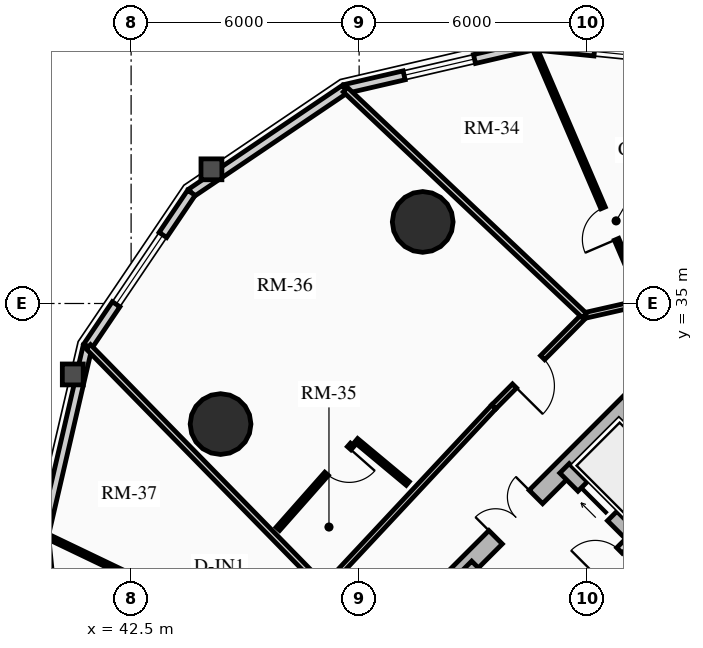
"""IFC4 building model, lengths in metres.
Left out: names, types, materials, properties, quantities, classifications, styles, units other than length and angle.
Written with IfcOpenShell. Run it as: python <this file> out.ifc"""

import sys

from ifc_helpers import new_model, si_unit, direction, frame, frame_2d, origin, origin_2d, place, context, subcontext, project, spatial, rectangle, circle, extrude, source, transform, mapped, element, fill, save


model = new_model("IFC4")
c1 = context("Model", 3, precision=1e-05, world=origin(), true_north=direction((0.0, 1.0)))
c2 = subcontext(c1, "Body", "Model", "MODEL_VIEW")
j1 = project(units=[si_unit("LENGTHUNIT", "METRE"), si_unit("PLANEANGLEUNIT", "RADIAN")], contexts=[c1])
p1 = place(None, origin())
s1 = spatial("IfcSite", under=j1, at=p1, CompositionType="ELEMENT")
p2 = place(p1, origin())
s2 = spatial("IfcBuilding", under=s1, at=p2, CompositionType="ELEMENT")
p3 = place(p2, frame((0.0, 0.0, 36.55)))
s3 = spatial("IfcBuildingStorey", under=s2, at=p3, CompositionType="ELEMENT", Elevation=36.55)
p4 = place(p3, frame((48.838, 25.596, 0.0), z_axis=(0.0, 0.0, 1.0), x_axis=(0.707106781187, 0.707106781187, 0.0)))
e1 = element("IfcWall", 1, at=p4, inside=s3, PredefinedType="SHEAR", context=c2, shape_type="SweptSolid", body=[
    extrude(rectangle(XDim=10.7, YDim=0.5, at=frame_2d((5.35, 0.0))), origin(), (0.0, 0.0, 1.0), 2.91),
])
m1 = source(origin(), c2, "Body", "SweptSolid", [
    extrude(rectangle(XDim=1.5, YDim=2.02, at=frame_2d((0.75, 1.01))), frame((0.0, 0.26, 0.0), z_axis=(0.0, -1.0, 0.0), x_axis=(1.0, 0.0, 0.0)), (0.0, 0.0, 1.0), 0.52),
])
p5 = place(p4, frame((4.6, 0.0, 0.0)))
e2 = element("IfcOpeningElement", 2, at=p5, cuts=e1, PredefinedType="OPENING", context=c2, shape_type="MappedRepresentation", body=[
    mapped(m1, transform((0.0, 0.0, 0.0), x_axis=(1.0, 0.0, 0.0), y_axis=(0.0, 1.0, 0.0), z_axis=(0.0, 0.0, 1.0), scale=1.0)),
])
p6 = place(p3, frame((61.096, 18.338, 0.0), z_axis=(0.0, 0.0, 1.0), x_axis=(-0.707106781187, 0.707106781187, 0.0)))
e3 = element("IfcWall", 3, at=p6, inside=s3, PredefinedType="SHEAR", context=c2, shape_type="SweptSolid", body=[
    extrude(rectangle(XDim=13.8, YDim=0.35, at=frame_2d((6.9, 0.0))), origin(), (0.0, 0.0, 1.0), 2.91),
])
m2 = source(origin(), c2, "Body", "SweptSolid", [
    extrude(rectangle(XDim=1.1, YDim=2.015, at=frame_2d((0.55, 1.007))), frame((0.0, 0.185, 0.0), z_axis=(0.0, -1.0, 0.0), x_axis=(1.0, 0.0, 0.0)), (0.0, 0.0, 1.0), 0.37),
])
p7 = place(p6, frame((4.9, 0.0, 0.0)))
e4 = element("IfcOpeningElement", 4, at=p7, cuts=e3, PredefinedType="OPENING", context=c2, shape_type="MappedRepresentation", body=[
    mapped(m2, transform((0.0, 0.0, 0.0), x_axis=(1.0, 0.0, 0.0), y_axis=(0.0, 1.0, 0.0), z_axis=(0.0, 0.0, 1.0), scale=1.0)),
])
m3 = source(origin(), c2, "Body", "SweptSolid", [
    extrude(rectangle(XDim=1.15, YDim=2.02, at=frame_2d((0.575, 1.01))), frame((0.0, 0.185, 0.0), z_axis=(0.0, -1.0, 0.0), x_axis=(1.0, 0.0, 0.0)), (0.0, 0.0, 1.0), 0.37),
])
p8 = place(p6, frame((7.32, 0.0, 0.0)))
e5 = element("IfcOpeningElement", 5, at=p8, cuts=e3, PredefinedType="OPENING", context=c2, shape_type="MappedRepresentation", body=[
    mapped(m3, transform((0.0, 0.0, 0.0), x_axis=(1.0, 0.0, 0.0), y_axis=(0.0, 1.0, 0.0), z_axis=(0.0, 0.0, 1.0), scale=1.0)),
])
p9 = place(p3, frame((63.662, 20.904, 0.0), z_axis=(0.0, 0.0, 1.0), x_axis=(-0.707106781187, 0.707106781187, 0.0)))
e6 = element("IfcWall", 6, at=p9, inside=s3, PredefinedType="SHEAR", context=c2, shape_type="SweptSolid", body=[
    extrude(rectangle(XDim=13.8, YDim=0.35, at=frame_2d((6.9, 0.0))), origin(), (0.0, 0.0, 1.0), 2.91),
])
p10 = place(p9, frame((10.025, 0.0, 0.0)))
e7 = element("IfcOpeningElement", 7, at=p10, cuts=e6, PredefinedType="OPENING", context=c2, shape_type="MappedRepresentation", body=[
    mapped(m2, transform((0.0, 0.0, 0.0), x_axis=(1.0, 0.0, 0.0), y_axis=(0.0, 1.0, 0.0), z_axis=(0.0, 0.0, 1.0), scale=1.0)),
])
p11 = place(p9, frame((12.025, 0.0, 0.0)))
e8 = element("IfcOpeningElement", 8, at=p11, cuts=e6, PredefinedType="OPENING", context=c2, shape_type="MappedRepresentation", body=[
    mapped(m2, transform((0.0, 0.0, 0.0), x_axis=(1.0, 0.0, 0.0), y_axis=(0.0, 1.0, 0.0), z_axis=(0.0, 0.0, 1.0), scale=1.0)),
])
p12 = place(p9, frame((5.33, 0.0, 0.0)))
e9 = element("IfcOpeningElement", 9, at=p12, cuts=e6, PredefinedType="OPENING", context=c2, shape_type="MappedRepresentation", body=[
    mapped(m3, transform((0.0, 0.0, 0.0), x_axis=(1.0, 0.0, 0.0), y_axis=(0.0, 1.0, 0.0), z_axis=(0.0, 0.0, 1.0), scale=1.0)),
])
for number, where, z_axis, x_axis in (
    (10, (50.173, 37.146, 0.0), (0.0, 0.0, 1.0), (1.0, 0.0, 0.0)),
    (11, (44.854, 31.827, 0.0), (0.0, 0.0, 1.0), (1.0, 0.0, 0.0)),
):
    element("IfcColumn", number, at=place(p3, frame(where, z_axis=z_axis, x_axis=x_axis)), inside=s3, PredefinedType="USERDEFINED", context=c2, shape_type="SweptSolid", body=[
        extrude(circle(Radius=0.8, at=origin_2d()), origin(), (0.0, 0.0, 1.0), 2.91),
    ])
p13 = place(p3, frame((53.09, 41.794, 0.0), z_axis=(0.0, 0.0, 1.0), x_axis=(0.994968263437, -0.100190592135, 0.0)))
e12 = element("IfcWall", 12, at=p13, inside=s3, PredefinedType="SOLIDWALL", context=c2, shape_type="SweptSolid", body=[
    extrude(rectangle(XDim=5.419, YDim=0.24, at=frame_2d((2.71, 0.0))), origin(), (0.0, 0.0, 1.0), 2.073),
])
m4 = source(origin(), c2, "Body", "SweptSolid", [
    extrude(rectangle(XDim=2.2, YDim=1.35, at=frame_2d((1.1, 0.675))), frame((0.0, 0.13, 0.0), z_axis=(0.0, -1.0, 0.0), x_axis=(1.0, 0.0, 0.0)), (0.0, 0.0, 1.0), 0.26),
])
p14 = place(p13, frame((1.61, 0.0, 0.65)))
e13 = element("IfcOpeningElement", 13, at=p14, cuts=e12, PredefinedType="OPENING", context=c2, shape_type="MappedRepresentation", body=[
    mapped(m4, transform((0.0, 0.0, 0.0), x_axis=(1.0, 0.0, 0.0), y_axis=(0.0, 1.0, 0.0), z_axis=(0.0, 0.0, 1.0), scale=1.0)),
])
p15 = place(p3, frame((48.129, 40.644, 0.0), z_axis=(0.0, 0.0, 1.0), x_axis=(0.974167686491, 0.22582585901, 0.0)))
e14 = element("IfcWall", 14, at=p15, inside=s3, PredefinedType="SOLIDWALL", context=c2, shape_type="SweptSolid", body=[
    extrude(rectangle(XDim=5.092, YDim=0.24, at=frame_2d((2.546, 0.0))), origin(), (0.0, 0.0, 1.0), 2.073),
])
m5 = source(origin(), c2, "Body", "SweptSolid", [
    extrude(rectangle(XDim=1.9, YDim=1.35, at=frame_2d((0.95, 0.675))), frame((0.0, 0.13, 0.0), z_axis=(0.0, -1.0, 0.0), x_axis=(1.0, 0.0, 0.0)), (0.0, 0.0, 1.0), 0.26),
])
p16 = place(p15, frame((1.596, 0.0, 0.65)))
e15 = element("IfcOpeningElement", 15, at=p16, cuts=e14, PredefinedType="OPENING", context=c2, shape_type="MappedRepresentation", body=[
    mapped(m5, transform((0.0, 0.0, 0.0), x_axis=(1.0, 0.0, 0.0), y_axis=(0.0, 1.0, 0.0), z_axis=(0.0, 0.0, 1.0), scale=1.0)),
])
p17 = place(p3, frame((44.086, 37.914, 0.0), z_axis=(0.0, 0.0, 1.0), x_axis=(0.828748297084, 0.559621532896, 0.0)))
e16 = element("IfcWall", 16, at=p17, inside=s3, PredefinedType="SOLIDWALL", context=c2, shape_type="SweptSolid", body=[
    extrude(rectangle(XDim=4.879, YDim=0.24, at=frame_2d((2.439, 0.0))), origin(), (0.0, 0.0, 1.0), 2.073),
])
p18 = place(p3, frame((41.356, 33.871, 0.0), z_axis=(0.0, 0.0, 1.0), x_axis=(0.559621532896, 0.828748297084, 0.0)))
e17 = element("IfcWall", 17, at=p18, inside=s3, PredefinedType="SOLIDWALL", context=c2, shape_type="SweptSolid", body=[
    extrude(rectangle(XDim=4.879, YDim=0.24, at=frame_2d((2.439, 0.0))), origin(), (0.0, 0.0, 1.0), 2.073),
])
p19 = place(p18, frame((1.339, 0.0, 0.65)))
e18 = element("IfcOpeningElement", 18, at=p19, cuts=e17, PredefinedType="OPENING", context=c2, shape_type="MappedRepresentation", body=[
    mapped(m4, transform((0.0, 0.0, 0.0), x_axis=(1.0, 0.0, 0.0), y_axis=(0.0, 1.0, 0.0), z_axis=(0.0, 0.0, 1.0), scale=1.0)),
])
p20 = place(p3, frame((40.206, 28.91, 0.0), z_axis=(0.0, 0.0, 1.0), x_axis=(0.22582585901, 0.974167686491, 0.0)))
e19 = element("IfcWall", 19, at=p20, inside=s3, PredefinedType="SOLIDWALL", context=c2, shape_type="SweptSolid", body=[
    extrude(rectangle(XDim=5.092, YDim=0.24, at=frame_2d((2.546, 0.0))), origin(), (0.0, 0.0, 1.0), 2.073),
])
p21 = place(p3, frame((40.749, 23.518, 0.0), z_axis=(0.0, 0.0, 1.0), x_axis=(-0.100190592135, 0.994968263437, 0.0)))
e20 = element("IfcWall", 20, at=p21, inside=s3, PredefinedType="SOLIDWALL", context=c2, shape_type="SweptSolid", body=[
    extrude(rectangle(XDim=5.419, YDim=0.24, at=frame_2d((2.71, 0.0))), origin(), (0.0, 0.0, 1.0), 2.073),
])
p22 = place(p21, frame((1.76, 0.0, 0.65)))
e21 = element("IfcOpeningElement", 21, at=p22, cuts=e20, PredefinedType="OPENING", context=c2, shape_type="MappedRepresentation", body=[
    mapped(m5, transform((0.0, 0.0, 0.0), x_axis=(1.0, 0.0, 0.0), y_axis=(0.0, 1.0, 0.0), z_axis=(0.0, 0.0, 1.0), scale=1.0)),
])
p23 = place(p3, frame((53.264, 26.416, 0.0), z_axis=(0.0, 0.0, 1.0), x_axis=(0.707106781187, 0.707106781187, 0.0)))
e22 = element("IfcWall", 22, at=p23, inside=s3, PredefinedType="PARTITIONING", context=c2, shape_type="SweptSolid", body=[
    extrude(rectangle(XDim=3.28, YDim=0.2, at=frame_2d((1.64, 0.0))), origin(), (0.0, 0.0, 1.0), 2.635),
])
m6 = source(origin(), c2, "Body", "SweptSolid", [
    extrude(rectangle(XDim=1.0, YDim=2.015, at=frame_2d((0.5, 1.007))), frame((0.0, 0.11, 0.0), z_axis=(0.0, -1.0, 0.0), x_axis=(1.0, 0.0, 0.0)), (0.0, 0.0, 1.0), 0.22),
])
p24 = place(p23, frame((0.14, 0.0, 0.0)))
e23 = element("IfcOpeningElement", 23, at=p24, cuts=e22, PredefinedType="OPENING", context=c2, shape_type="MappedRepresentation", body=[
    mapped(m6, transform((0.0, 0.0, 0.0), x_axis=(1.0, 0.0, 0.0), y_axis=(0.0, 1.0, 0.0), z_axis=(0.0, 0.0, 1.0), scale=1.0)),
])
m7 = source(origin(), c2, "Body", "SweptSolid", [
    extrude(rectangle(XDim=0.9, YDim=2.005, at=frame_2d((0.45, 1.002))), frame((0.0, 0.11, 0.0), z_axis=(0.0, -1.0, 0.0), x_axis=(1.0, 0.0, 0.0)), (0.0, 0.0, 1.0), 0.22),
])
p25 = place(p23, frame((2.05, 0.0, 0.0)))
e24 = element("IfcOpeningElement", 24, at=p25, cuts=e22, PredefinedType="OPENING", context=c2, shape_type="MappedRepresentation", body=[
    mapped(m7, transform((0.0, 0.0, 0.0), x_axis=(1.0, 0.0, 0.0), y_axis=(0.0, 1.0, 0.0), z_axis=(0.0, 0.0, 1.0), scale=1.0)),
])
p26 = place(p3, frame((55.984, 35.035, 0.0), z_axis=(0.0, 0.0, 1.0), x_axis=(-0.975290305708, -0.22092718165, 0.0)))
e25 = element("IfcWall", 25, at=p26, inside=s3, PredefinedType="PARTITIONING", context=c2, shape_type="SweptSolid", body=[
    extrude(rectangle(XDim=1.597, YDim=0.15, at=frame_2d((0.798, 0.0))), origin(), (0.0, 0.0, 1.0), 2.205),
])
p27 = place(p3, frame((54.427, 34.683, 0.0), z_axis=(0.0, 0.0, 1.0), x_axis=(-0.704178989986, -0.710022499687, 0.0)))
e26 = element("IfcWall", 26, at=p27, inside=s3, PredefinedType="PARTITIONING", context=c2, shape_type="SweptSolid", body=[
    extrude(rectangle(XDim=3.384, YDim=0.15, at=frame_2d((1.692, 0.0))), origin(), (0.0, 0.0, 1.0), 2.159),
])
m8 = source(origin(), c2, "Body", "SweptSolid", [
    extrude(rectangle(XDim=1.05, YDim=2.015, at=frame_2d((0.525, 1.007))), frame((0.0, 0.085, 0.0), z_axis=(0.0, -1.0, 0.0), x_axis=(1.0, 0.0, 0.0)), (0.0, 0.0, 1.0), 0.17),
])
p28 = place(p27, frame((1.56, 0.0, 0.0)))
e27 = element("IfcOpeningElement", 27, at=p28, cuts=e26, PredefinedType="OPENING", context=c2, shape_type="MappedRepresentation", body=[
    mapped(m8, transform((0.0, 0.0, 0.0), x_axis=(1.0, 0.0, 0.0), y_axis=(0.0, 1.0, 0.0), z_axis=(0.0, 0.0, 1.0), scale=1.0)),
])
p29 = place(p3, frame((52.043, 32.28, 0.0), z_axis=(0.0, 0.0, 1.0), x_axis=(-0.682606081633, -0.730786519661, 0.0)))
e28 = element("IfcWall", 28, at=p29, inside=s3, PredefinedType="PARTITIONING", context=c2, shape_type="SweptSolid", body=[
    extrude(rectangle(XDim=6.527, YDim=0.15, at=frame_2d((3.263, 0.0))), origin(), (0.0, 0.0, 1.0), 2.159),
])
p30 = place(p3, frame((54.427, 34.683, 0.0), z_axis=(0.0, 0.0, 1.0), x_axis=(-0.726732956694, 0.686920089716, 0.0)))
e29 = element("IfcWall", 29, at=p30, inside=s3, PredefinedType="PARTITIONING", context=c2, shape_type="SweptSolid", body=[
    extrude(rectangle(XDim=8.653, YDim=0.16, at=frame_2d((4.326, 0.0))), origin(), (0.0, 0.0, 1.0), 2.073),
])
p31 = place(p3, frame((47.588, 27.51, 0.0), z_axis=(0.0, 0.0, 1.0), x_axis=(-0.699371977892, 0.714757886657, 0.0)))
e30 = element("IfcWall", 30, at=p31, inside=s3, PredefinedType="PARTITIONING", context=c2, shape_type="SweptSolid", body=[
    extrude(rectangle(XDim=8.886, YDim=0.16, at=frame_2d((4.443, 0.0))), origin(), (0.0, 0.0, 1.0), 2.073),
])
p32 = place(p3, frame((55.984, 35.035, 0.0), z_axis=(0.0, 0.0, 1.0), x_axis=(-0.394244760106, 0.919005478291, 0.0)))
e31 = element("IfcWall", 31, at=p32, inside=s3, PredefinedType="PARTITIONING", context=c2, shape_type="SweptSolid", body=[
    extrude(rectangle(XDim=7.333, YDim=0.125, at=frame_2d((3.667, 0.0))), origin(), (0.0, 0.0, 1.0), 2.073),
])
m9 = source(origin(), c2, "Body", "SweptSolid", [
    extrude(rectangle(XDim=0.9, YDim=2.005, at=frame_2d((0.45, 1.002))), frame((0.0, 0.073, 0.0), z_axis=(0.0, -1.0, 0.0), x_axis=(1.0, 0.0, 0.0)), (0.0, 0.0, 1.0), 0.145),
])
p33 = place(p32, frame((1.8, 0.0, 0.0)))
e32 = element("IfcOpeningElement", 32, at=p33, cuts=e31, PredefinedType="OPENING", context=c2, shape_type="MappedRepresentation", body=[
    mapped(m9, transform((0.0, 0.0, 0.0), x_axis=(1.0, 0.0, 0.0), y_axis=(0.0, 1.0, 0.0), z_axis=(0.0, 0.0, 1.0), scale=1.0)),
])
p34 = place(p3, frame((49.78, 30.264, 0.0), z_axis=(0.0, 0.0, 1.0), x_axis=(-0.768209972595, 0.640197967824, 0.0)))
e33 = element("IfcWall", 33, at=p34, inside=s3, PredefinedType="PARTITIONING", context=c2, shape_type="SweptSolid", body=[
    extrude(rectangle(XDim=1.77, YDim=0.125, at=frame_2d((0.885, 0.0))), origin(), (0.0, 0.0, 1.0), 2.635),
])
p35 = place(p3, frame((48.318, 31.282, 0.0), z_axis=(0.0, 0.0, 1.0), x_axis=(-0.662365127428, -0.749181178333, 0.0)))
e34 = element("IfcWall", 34, at=p35, inside=s3, PredefinedType="PARTITIONING", context=c2, shape_type="SweptSolid", body=[
    extrude(rectangle(XDim=2.953, YDim=0.125, at=frame_2d((1.477, 0.0))), origin(), (0.0, 0.0, 1.0), 2.159),
])
p36 = place(p35, frame((0.12, 0.0, 0.0)))
e35 = element("IfcOpeningElement", 35, at=p36, cuts=e34, PredefinedType="OPENING", context=c2, shape_type="MappedRepresentation", body=[
    mapped(m9, transform((0.0, 0.0, 0.0), x_axis=(1.0, 0.0, 0.0), y_axis=(0.0, 1.0, 0.0), z_axis=(0.0, 0.0, 1.0), scale=1.0)),
])
p37 = place(p3, frame((46.543, 25.882, 0.0), z_axis=(0.0, 0.0, 1.0), x_axis=(-0.901937110034, 0.431867398103, 0.0)))
e36 = element("IfcWall", 36, at=p37, inside=s3, PredefinedType="PARTITIONING", context=c2, shape_type="SweptSolid", body=[
    extrude(rectangle(XDim=7.004, YDim=0.125, at=frame_2d((3.502, 0.0))), origin(), (0.0, 0.0, 1.0), 2.073),
])
p38 = place(p37, frame((1.8, 0.0, 0.0)))
e37 = element("IfcOpeningElement", 37, at=p38, cuts=e36, PredefinedType="OPENING", context=c2, shape_type="MappedRepresentation", body=[
    mapped(m9, transform((0.0, 0.0, 0.0), x_axis=(1.0, 0.0, 0.0), y_axis=(0.0, 1.0, 0.0), z_axis=(0.0, 0.0, 1.0), scale=1.0)),
])
m10 = source(origin(), c2, "Body", "SweptSolid", [
    extrude(rectangle(XDim=2.2, YDim=1.35, at=frame_2d((1.1, 0.675))), frame((0.0, 0.03, 0.0), z_axis=(0.0, -1.0, 0.0), x_axis=(1.0, 0.0, 0.0)), (0.0, 0.0, 1.0), 0.06),
])
p39 = place(p14, origin())
e38 = element("IfcWindow", 38, at=p39, inside=s3, PartitioningType="DOUBLE_PANEL_VERTICAL", PredefinedType="WINDOW", context=c2, shape_type="MappedRepresentation", body=[
    mapped(m10, transform((0.0, 0.0, 0.0), x_axis=(1.0, 0.0, 0.0), y_axis=(0.0, 1.0, 0.0), z_axis=(0.0, 0.0, 1.0), scale=1.0)),
])
fill(e13, e38)
m11 = source(origin(), c2, "Body", "SweptSolid", [
    extrude(rectangle(XDim=1.9, YDim=1.35, at=frame_2d((0.95, 0.675))), frame((0.0, 0.03, 0.0), z_axis=(0.0, -1.0, 0.0), x_axis=(1.0, 0.0, 0.0)), (0.0, 0.0, 1.0), 0.06),
])
p40 = place(p16, origin())
e39 = element("IfcWindow", 39, at=p40, inside=s3, PartitioningType="DOUBLE_PANEL_VERTICAL", PredefinedType="WINDOW", context=c2, shape_type="MappedRepresentation", body=[
    mapped(m11, transform((0.0, 0.0, 0.0), x_axis=(1.0, 0.0, 0.0), y_axis=(0.0, 1.0, 0.0), z_axis=(0.0, 0.0, 1.0), scale=1.0)),
])
fill(e15, e39)
p41 = place(p19, origin())
e40 = element("IfcWindow", 40, at=p41, inside=s3, PartitioningType="DOUBLE_PANEL_VERTICAL", PredefinedType="WINDOW", context=c2, shape_type="MappedRepresentation", body=[
    mapped(m10, transform((0.0, 0.0, 0.0), x_axis=(1.0, 0.0, 0.0), y_axis=(0.0, 1.0, 0.0), z_axis=(0.0, 0.0, 1.0), scale=1.0)),
])
fill(e18, e40)
m12 = source(origin(), c2, "Body", "SweptSolid", [
    extrude(rectangle(XDim=1.1, YDim=2.015, at=frame_2d((0.55, 1.007))), frame((0.0, 0.025, 0.0), z_axis=(0.0, -1.0, 0.0), x_axis=(1.0, 0.0, 0.0)), (0.0, 0.0, 1.0), 0.05),
])
p42 = place(p11, origin())
e41 = element("IfcDoor", 41, at=p42, inside=s3, OperationType="SLIDING_TO_RIGHT", PredefinedType="DOOR", context=c2, shape_type="MappedRepresentation", body=[
    mapped(m12, transform((0.0, 0.0, 0.0), x_axis=(1.0, 0.0, 0.0), y_axis=(0.0, 1.0, 0.0), z_axis=(0.0, 0.0, 1.0), scale=1.0)),
])
fill(e8, e41)
m13 = source(origin(), c2, "Body", "SweptSolid", [
    extrude(rectangle(XDim=1.5, YDim=2.02, at=frame_2d((0.75, 1.01))), frame((0.0, 0.025, 0.0), z_axis=(0.0, -1.0, 0.0), x_axis=(1.0, 0.0, 0.0)), (0.0, 0.0, 1.0), 0.05),
])
p43 = place(p5, origin())
e42 = element("IfcDoor", 42, at=p43, inside=s3, OperationType="DOUBLE_DOOR_SINGLE_SWING", PredefinedType="DOOR", context=c2, shape_type="MappedRepresentation", body=[
    mapped(m13, transform((0.0, 0.0, 0.0), x_axis=(1.0, 0.0, 0.0), y_axis=(0.0, 1.0, 0.0), z_axis=(0.0, 0.0, 1.0), scale=1.0)),
])
fill(e2, e42)
m14 = source(origin(), c2, "Body", "SweptSolid", [
    extrude(rectangle(XDim=0.9, YDim=2.005, at=frame_2d((0.45, 1.002))), frame((0.0, 0.025, 0.0), z_axis=(0.0, -1.0, 0.0), x_axis=(1.0, 0.0, 0.0)), (0.0, 0.0, 1.0), 0.05),
])
p44 = place(p25, origin())
e43 = element("IfcDoor", 43, at=p44, inside=s3, OperationType="SINGLE_SWING_LEFT", PredefinedType="DOOR", context=c2, shape_type="MappedRepresentation", body=[
    mapped(m14, transform((0.0, 0.0, 0.0), x_axis=(1.0, 0.0, 0.0), y_axis=(0.0, 1.0, 0.0), z_axis=(0.0, 0.0, 1.0), scale=1.0)),
])
fill(e24, e43)
p45 = place(p33, origin())
e44 = element("IfcDoor", 44, at=p45, inside=s3, OperationType="SINGLE_SWING_LEFT", PredefinedType="DOOR", context=c2, shape_type="MappedRepresentation", body=[
    mapped(m14, transform((0.0, 0.0, 0.0), x_axis=(1.0, 0.0, 0.0), y_axis=(0.0, 1.0, 0.0), z_axis=(0.0, 0.0, 1.0), scale=1.0)),
])
fill(e32, e44)
m15 = source(origin(), c2, "Body", "SweptSolid", [
    extrude(rectangle(XDim=1.05, YDim=2.015, at=frame_2d((0.525, 1.007))), frame((0.0, 0.025, 0.0), z_axis=(0.0, -1.0, 0.0), x_axis=(1.0, 0.0, 0.0)), (0.0, 0.0, 1.0), 0.05),
])
p46 = place(p28, origin())
e45 = element("IfcDoor", 45, at=p46, inside=s3, OperationType="SINGLE_SWING_RIGHT", PredefinedType="DOOR", context=c2, shape_type="MappedRepresentation", body=[
    mapped(m15, transform((0.0, 0.0, 0.0), x_axis=(1.0, 0.0, 0.0), y_axis=(0.0, 1.0, 0.0), z_axis=(0.0, 0.0, 1.0), scale=1.0)),
])
fill(e27, e45)
p47 = place(p36, origin())
e46 = element("IfcDoor", 46, at=p47, inside=s3, OperationType="SINGLE_SWING_LEFT", PredefinedType="DOOR", context=c2, shape_type="MappedRepresentation", body=[
    mapped(m14, transform((0.0, 0.0, 0.0), x_axis=(1.0, 0.0, 0.0), y_axis=(0.0, 1.0, 0.0), z_axis=(0.0, 0.0, 1.0), scale=1.0)),
])
fill(e35, e46)
save(model, sys.argv[1])
